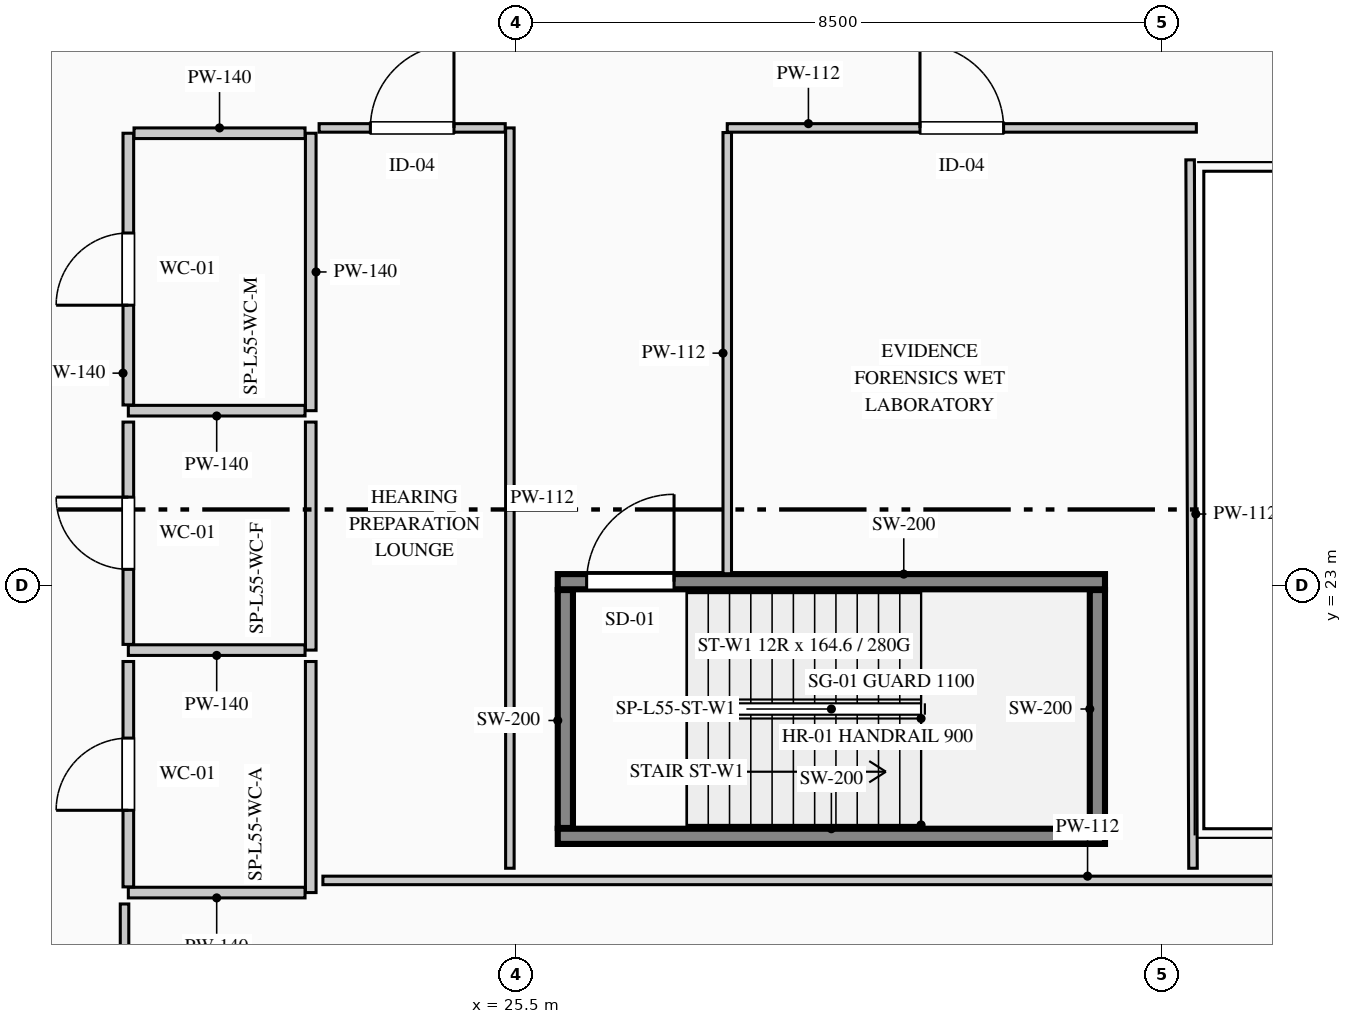
"""IFC4 building model, lengths in metres.
Left out: names, types, materials, properties, quantities, classifications, styles, units other than length and angle.
Written with IfcOpenShell. Run it as: python <this file> out.ifc"""

import sys

from ifc_helpers import new_model, si_unit, direction, frame, frame_2d, origin, place, context, subcontext, project, spatial, rectangle, extrude, element, fill, save


model = new_model("IFC4")
c1 = context("Model", 3, precision=1e-05, world=origin(), true_north=direction((0.0, 1.0)))
c2 = subcontext(c1, "Body", "Model", "MODEL_VIEW")
j1 = project(units=[si_unit("LENGTHUNIT", "METRE"), si_unit("PLANEANGLEUNIT", "RADIAN")], contexts=[c1])
p1 = place(None, origin())
s1 = spatial("IfcSite", under=j1, at=p1, CompositionType="ELEMENT")
p2 = place(p1, origin())
s2 = spatial("IfcBuilding", under=s1, at=p2, CompositionType="ELEMENT")
p3 = place(p2, frame((0.0, 0.0, 231.15)))
s3 = spatial("IfcBuildingStorey", under=s2, at=p3, CompositionType="ELEMENT", Elevation=231.15)
p4 = place(p3, frame((26.05, 19.7, 0.0), z_axis=(0.0, 0.0, 1.0), x_axis=(1.0, 0.0, 0.0)))
e1 = element("IfcWall", 1, at=p4, inside=s3, PredefinedType="SHEAR", context=c2, shape_type="SweptSolid", body=[
    extrude(rectangle(XDim=7.2, YDim=0.2, at=frame_2d((3.6, 0.0))), origin(), (0.0, 0.0, 1.0), 3.95),
])
p5 = place(p3, frame((26.05, 23.05, 0.0), z_axis=(0.0, 0.0, 1.0), x_axis=(1.0, 0.0, 0.0)))
e2 = element("IfcWall", 2, at=p5, inside=s3, PredefinedType="SHEAR", context=c2, shape_type="SweptSolid", body=[
    extrude(rectangle(XDim=7.2, YDim=0.2, at=frame_2d((3.6, 0.0))), origin(), (0.0, 0.0, 1.0), 3.95),
])
p6 = place(p5, frame((0.38, 0.0, 0.0)))
e3 = element("IfcOpeningElement", 3, at=p6, cuts=e2, PredefinedType="OPENING", context=c2, shape_type="SweptSolid", body=[
    extrude(rectangle(XDim=1.15, YDim=2.2, at=frame_2d((0.575, 1.1))), frame((0.0, 0.11, 0.0), z_axis=(0.0, -1.0, 0.0), x_axis=(1.0, 0.0, 0.0)), (0.0, 0.0, 1.0), 0.22),
])
for number, where, z_axis, x_axis in (
    (4, (26.15, 19.81, 0.0), (0.0, 0.0, 1.0), (0.0, 1.0, 0.0)),
    (5, (33.15, 19.81, 0.0), (0.0, 0.0, 1.0), (0.0, 1.0, 0.0)),
):
    element("IfcWall", number, at=place(p3, frame(where, z_axis=z_axis, x_axis=x_axis)), inside=s3, PredefinedType="SHEAR", context=c2, shape_type="SweptSolid", body=[
        extrude(rectangle(XDim=3.13, YDim=0.2, at=frame_2d((1.565, 0.0))), origin(), (0.0, 0.0, 1.0), 3.95),
    ])
p7 = place(p3, frame((22.8, 28.95, 0.0), z_axis=(0.0, 0.0, 1.0), x_axis=(0.0, -1.0, 0.0)))
e6 = element("IfcWall", 6, at=p7, inside=s3, PredefinedType="PARTITIONING", context=c2, shape_type="SweptSolid", body=[
    extrude(rectangle(XDim=3.65, YDim=0.14, at=frame_2d((1.825, 0.0))), origin(), (0.0, 0.0, 1.0), 3.285),
])
p8 = place(p3, frame((22.725, 25.3, 0.0), z_axis=(0.0, 0.0, 1.0), x_axis=(-1.0, 0.0, 0.0)))
e7 = element("IfcWall", 7, at=p8, inside=s3, PredefinedType="PARTITIONING", context=c2, shape_type="SweptSolid", body=[
    extrude(rectangle(XDim=2.325, YDim=0.14, at=frame_2d((1.163, 0.0))), origin(), (0.0, 0.0, 1.0), 3.7),
])
p9 = place(p3, frame((20.4, 25.375, 0.0), z_axis=(0.0, 0.0, 1.0), x_axis=(0.0, 1.0, 0.0)))
e8 = element("IfcWall", 8, at=p9, inside=s3, PredefinedType="PARTITIONING", context=c2, shape_type="SweptSolid", body=[
    extrude(rectangle(XDim=3.575, YDim=0.14, at=frame_2d((1.788, 0.0))), origin(), (0.0, 0.0, 1.0), 3.7),
])
p10 = place(p9, frame((1.312, 0.0, 0.0)))
e9 = element("IfcOpeningElement", 9, at=p10, cuts=e8, PredefinedType="OPENING", context=c2, shape_type="SweptSolid", body=[
    extrude(rectangle(XDim=0.95, YDim=2.15, at=frame_2d((0.475, 1.075))), frame((0.0, 0.08, 0.0), z_axis=(0.0, -1.0, 0.0), x_axis=(1.0, 0.0, 0.0)), (0.0, 0.0, 1.0), 0.16),
])
p11 = place(p3, frame((20.475, 28.95, 0.0), z_axis=(0.0, 0.0, 1.0), x_axis=(1.0, 0.0, 0.0)))
e10 = element("IfcWall", 10, at=p11, inside=s3, PredefinedType="PARTITIONING", context=c2, shape_type="SweptSolid", body=[
    extrude(rectangle(XDim=2.25, YDim=0.14, at=frame_2d((1.125, 0.0))), origin(), (0.0, 0.0, 1.0), 3.7),
])
p12 = place(p3, frame((22.8, 25.15, 0.0), z_axis=(0.0, 0.0, 1.0), x_axis=(0.0, -1.0, 0.0)))
e11 = element("IfcWall", 11, at=p12, inside=s3, PredefinedType="PARTITIONING", context=c2, shape_type="SweptSolid", body=[
    extrude(rectangle(XDim=3.0, YDim=0.14, at=frame_2d((1.5, 0.0))), origin(), (0.0, 0.0, 1.0), 3.285),
])
p13 = place(p3, frame((22.725, 22.15, 0.0), z_axis=(0.0, 0.0, 1.0), x_axis=(-1.0, 0.0, 0.0)))
e12 = element("IfcWall", 12, at=p13, inside=s3, PredefinedType="PARTITIONING", context=c2, shape_type="SweptSolid", body=[
    extrude(rectangle(XDim=2.325, YDim=0.14, at=frame_2d((1.163, 0.0))), origin(), (0.0, 0.0, 1.0), 3.7),
])
p14 = place(p3, frame((20.4, 22.225, 0.0), z_axis=(0.0, 0.0, 1.0), x_axis=(0.0, 1.0, 0.0)))
e13 = element("IfcWall", 13, at=p14, inside=s3, PredefinedType="PARTITIONING", context=c2, shape_type="SweptSolid", body=[
    extrude(rectangle(XDim=2.925, YDim=0.14, at=frame_2d((1.462, 0.0))), origin(), (0.0, 0.0, 1.0), 3.7),
])
p15 = place(p14, frame((0.988, 0.0, 0.0)))
e14 = element("IfcOpeningElement", 14, at=p15, cuts=e13, PredefinedType="OPENING", context=c2, shape_type="SweptSolid", body=[
    extrude(rectangle(XDim=0.95, YDim=2.15, at=frame_2d((0.475, 1.075))), frame((0.0, 0.08, 0.0), z_axis=(0.0, -1.0, 0.0), x_axis=(1.0, 0.0, 0.0)), (0.0, 0.0, 1.0), 0.16),
])
p16 = place(p3, frame((22.8, 22.0, 0.0), z_axis=(0.0, 0.0, 1.0), x_axis=(0.0, -1.0, 0.0)))
e15 = element("IfcWall", 15, at=p16, inside=s3, PredefinedType="PARTITIONING", context=c2, shape_type="SweptSolid", body=[
    extrude(rectangle(XDim=3.04, YDim=0.14, at=frame_2d((1.52, 0.0))), origin(), (0.0, 0.0, 1.0), 3.285),
])
p17 = place(p3, frame((22.725, 18.96, 0.0), z_axis=(0.0, 0.0, 1.0), x_axis=(-1.0, 0.0, 0.0)))
e16 = element("IfcWall", 16, at=p17, inside=s3, PredefinedType="PARTITIONING", context=c2, shape_type="SweptSolid", body=[
    extrude(rectangle(XDim=2.325, YDim=0.14, at=frame_2d((1.163, 0.0))), origin(), (0.0, 0.0, 1.0), 3.7),
])
p18 = place(p3, frame((20.4, 19.035, 0.0), z_axis=(0.0, 0.0, 1.0), x_axis=(0.0, 1.0, 0.0)))
e17 = element("IfcWall", 17, at=p18, inside=s3, PredefinedType="PARTITIONING", context=c2, shape_type="SweptSolid", body=[
    extrude(rectangle(XDim=2.965, YDim=0.14, at=frame_2d((1.482, 0.0))), origin(), (0.0, 0.0, 1.0), 3.7),
])
p19 = place(p18, frame((1.008, 0.0, 0.0)))
e18 = element("IfcOpeningElement", 18, at=p19, cuts=e17, PredefinedType="OPENING", context=c2, shape_type="SweptSolid", body=[
    extrude(rectangle(XDim=0.95, YDim=2.15, at=frame_2d((0.475, 1.075))), frame((0.0, 0.08, 0.0), z_axis=(0.0, -1.0, 0.0), x_axis=(1.0, 0.0, 0.0)), (0.0, 0.0, 1.0), 0.16),
])
p20 = place(p3, frame((20.35, 12.8, 0.0), z_axis=(0.0, 0.0, 1.0), x_axis=(0.0, 1.0, 0.0)))
e19 = element("IfcWall", 19, at=p20, inside=s3, PredefinedType="PARTITIONING", context=c2, shape_type="SweptSolid", body=[
    extrude(rectangle(XDim=6.01, YDim=0.112, at=frame_2d((3.005, 0.0))), origin(), (0.0, 0.0, 1.0), 3.7),
])
p21 = place(p20, frame((2.455, 0.0, 0.0)))
e20 = element("IfcOpeningElement", 20, at=p21, cuts=e19, PredefinedType="OPENING", context=c2, shape_type="SweptSolid", body=[
    extrude(rectangle(XDim=1.1, YDim=2.2, at=frame_2d((0.55, 1.1))), frame((0.0, 0.066, 0.0), z_axis=(0.0, -1.0, 0.0), x_axis=(1.0, 0.0, 0.0)), (0.0, 0.0, 1.0), 0.132),
])
p22 = place(p3, frame((22.96, 19.12, 0.0), z_axis=(0.0, 0.0, 1.0), x_axis=(1.0, 0.0, 0.0)))
e21 = element("IfcWall", 21, at=p22, inside=s3, PredefinedType="PARTITIONING", context=c2, shape_type="SweptSolid", body=[
    extrude(rectangle(XDim=20.121, YDim=0.112, at=frame_2d((10.061, 0.0))), origin(), (0.0, 0.0, 1.0), 3.7),
])
p23 = place(p3, frame((25.42, 29.02, 0.0), z_axis=(0.0, 0.0, 1.0), x_axis=(0.0, -1.0, 0.0)))
e22 = element("IfcWall", 22, at=p23, inside=s3, PredefinedType="PARTITIONING", context=c2, shape_type="SweptSolid", body=[
    extrude(rectangle(XDim=9.74, YDim=0.112, at=frame_2d((4.87, 0.0))), origin(), (0.0, 0.0, 1.0), 2.885),
])
p24 = place(p3, frame((22.91, 29.02, 0.0), z_axis=(0.0, 0.0, 1.0), x_axis=(1.0, 0.0, 0.0)))
e23 = element("IfcWall", 23, at=p24, inside=s3, PredefinedType="PARTITIONING", context=c2, shape_type="SweptSolid", body=[
    extrude(rectangle(XDim=2.449, YDim=0.112, at=frame_2d((1.225, 0.0))), origin(), (0.0, 0.0, 1.0), 3.7),
])
p25 = place(p24, frame((0.675, 0.0, 0.0)))
e24 = element("IfcOpeningElement", 24, at=p25, cuts=e23, PredefinedType="OPENING", context=c2, shape_type="SweptSolid", body=[
    extrude(rectangle(XDim=1.1, YDim=2.2, at=frame_2d((0.55, 1.1))), frame((0.0, 0.066, 0.0), z_axis=(0.0, -1.0, 0.0), x_axis=(1.0, 0.0, 0.0)), (0.0, 0.0, 1.0), 0.132),
])
p26 = place(p3, frame((28.28, 29.02, 0.0), z_axis=(0.0, 0.0, 1.0), x_axis=(1.0, 0.0, 0.0)))
e25 = element("IfcWall", 25, at=p26, inside=s3, PredefinedType="PARTITIONING", context=c2, shape_type="SweptSolid", body=[
    extrude(rectangle(XDim=6.172, YDim=0.112, at=frame_2d((3.086, 0.0))), origin(), (0.0, 0.0, 1.0), 3.485),
])
p27 = place(p26, frame((2.536, 0.0, 0.0)))
e26 = element("IfcOpeningElement", 26, at=p27, cuts=e25, PredefinedType="OPENING", context=c2, shape_type="SweptSolid", body=[
    extrude(rectangle(XDim=1.1, YDim=2.2, at=frame_2d((0.55, 1.1))), frame((0.0, 0.066, 0.0), z_axis=(0.0, -1.0, 0.0), x_axis=(1.0, 0.0, 0.0)), (0.0, 0.0, 1.0), 0.132),
])
p28 = place(p3, frame((34.37, 28.6, 0.0), z_axis=(0.0, 0.0, 1.0), x_axis=(0.004060215387, -0.999991757292, 0.0)))
e27 = element("IfcWall", 27, at=p28, inside=s3, PredefinedType="PARTITIONING", context=c2, shape_type="SweptSolid", body=[
    extrude(rectangle(XDim=9.32, YDim=0.112, at=frame_2d((4.66, 0.0))), origin(), (0.0, 0.0, 1.0), 3.7),
])
p29 = place(p3, frame((28.28, 23.155, 0.0), z_axis=(0.0, 0.0, 1.0), x_axis=(0.0, 1.0, 0.0)))
e28 = element("IfcWall", 28, at=p29, inside=s3, PredefinedType="PARTITIONING", context=c2, shape_type="SweptSolid", body=[
    extrude(rectangle(XDim=5.804, YDim=0.112, at=frame_2d((2.902, 0.0))), origin(), (0.0, 0.0, 1.0), 3.7),
])
p30 = place(p6, origin())
e29 = element("IfcDoor", 29, at=p30, inside=s3, OperationType="SINGLE_SWING_RIGHT", PredefinedType="DOOR", context=c2, shape_type="SweptSolid", body=[
    extrude(rectangle(XDim=1.15, YDim=2.2, at=frame_2d((0.575, 1.1))), frame((0.0, 0.025, 0.0), z_axis=(0.0, -1.0, 0.0), x_axis=(1.0, 0.0, 0.0)), (0.0, 0.0, 1.0), 0.05),
])
fill(e3, e29)
p31 = place(p10, origin())
e30 = element("IfcDoor", 30, at=p31, inside=s3, OperationType="SINGLE_SWING_LEFT", PredefinedType="DOOR", context=c2, shape_type="SweptSolid", body=[
    extrude(rectangle(XDim=0.95, YDim=2.15, at=frame_2d((0.475, 1.075))), frame((0.0, 0.025, 0.0), z_axis=(0.0, -1.0, 0.0), x_axis=(1.0, 0.0, 0.0)), (0.0, 0.0, 1.0), 0.05),
])
fill(e9, e30)
p32 = place(p15, origin())
e31 = element("IfcDoor", 31, at=p32, inside=s3, OperationType="SINGLE_SWING_RIGHT", PredefinedType="DOOR", context=c2, shape_type="SweptSolid", body=[
    extrude(rectangle(XDim=0.95, YDim=2.15, at=frame_2d((0.475, 1.075))), frame((0.0, 0.025, 0.0), z_axis=(0.0, -1.0, 0.0), x_axis=(1.0, 0.0, 0.0)), (0.0, 0.0, 1.0), 0.05),
])
fill(e14, e31)
p33 = place(p19, origin())
e32 = element("IfcDoor", 32, at=p33, inside=s3, OperationType="SINGLE_SWING_LEFT", PredefinedType="DOOR", context=c2, shape_type="SweptSolid", body=[
    extrude(rectangle(XDim=0.95, YDim=2.15, at=frame_2d((0.475, 1.075))), frame((0.0, 0.025, 0.0), z_axis=(0.0, -1.0, 0.0), x_axis=(1.0, 0.0, 0.0)), (0.0, 0.0, 1.0), 0.05),
])
fill(e18, e32)
p34 = place(p25, origin())
e33 = element("IfcDoor", 33, at=p34, inside=s3, OperationType="SINGLE_SWING_RIGHT", PredefinedType="DOOR", context=c2, shape_type="SweptSolid", body=[
    extrude(rectangle(XDim=1.1, YDim=2.2, at=frame_2d((0.55, 1.1))), frame((0.0, 0.025, 0.0), z_axis=(0.0, -1.0, 0.0), x_axis=(1.0, 0.0, 0.0)), (0.0, 0.0, 1.0), 0.05),
])
fill(e24, e33)
p35 = place(p27, origin())
e34 = element("IfcDoor", 34, at=p35, inside=s3, OperationType="SINGLE_SWING_LEFT", PredefinedType="DOOR", context=c2, shape_type="SweptSolid", body=[
    extrude(rectangle(XDim=1.1, YDim=2.2, at=frame_2d((0.55, 1.1))), frame((0.0, 0.025, 0.0), z_axis=(0.0, -1.0, 0.0), x_axis=(1.0, 0.0, 0.0)), (0.0, 0.0, 1.0), 0.05),
])
fill(e26, e34)
save(model, sys.argv[1])
